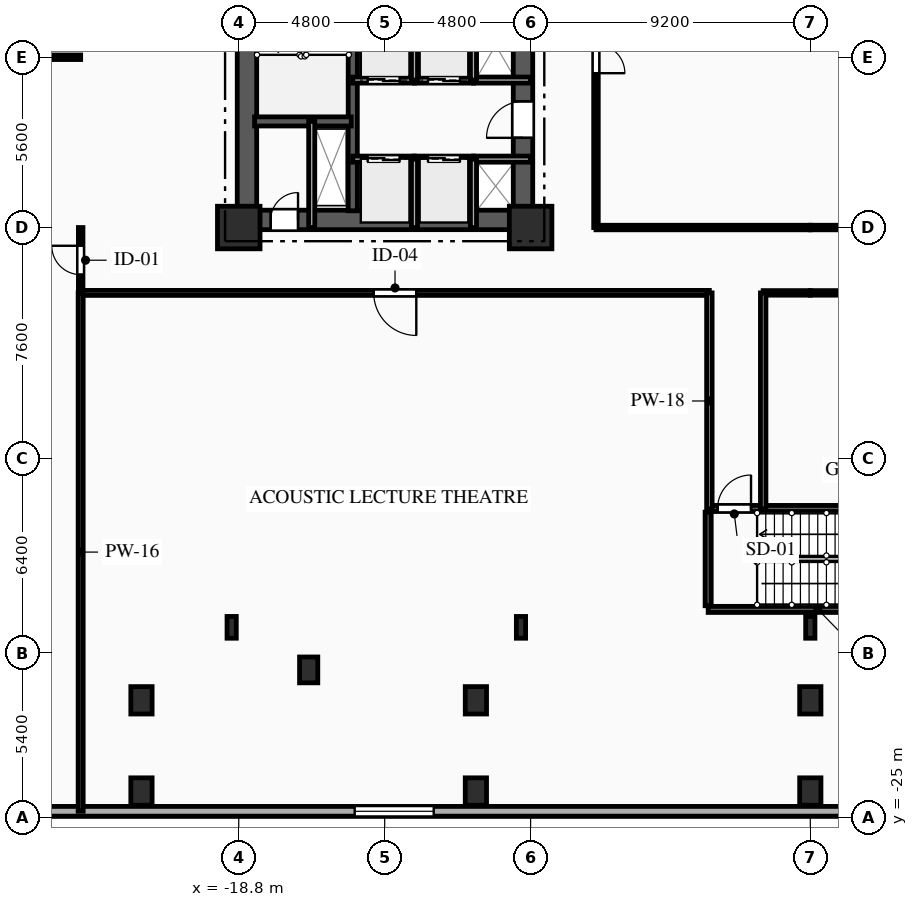
"""IFC4 building model, lengths in metres.
Left out: names, types, materials, properties, quantities, classifications, styles, units other than length and angle.
Written with IfcOpenShell. Run it as: python <this file> out.ifc"""

import sys

from ifc_helpers import new_model, si_unit, direction, frame, frame_2d, origin, origin_2d, place, context, subcontext, project, spatial, rectangle, i_section, extrude, element, fill, save


model = new_model("IFC4")
c1 = context("Model", 3, precision=1e-05, world=origin(), true_north=direction((0.0, 1.0)))
c2 = subcontext(c1, "Body", "Model", "MODEL_VIEW")
j1 = project(units=[si_unit("LENGTHUNIT", "METRE"), si_unit("PLANEANGLEUNIT", "RADIAN")], contexts=[c1])
p1 = place(None, origin())
s1 = spatial("IfcSite", under=j1, at=p1, CompositionType="ELEMENT")
p2 = place(p1, origin())
s2 = spatial("IfcBuilding", under=s1, at=p2, CompositionType="ELEMENT")
p3 = place(p2, frame((0.0, 0.0, 9.0)))
s3 = spatial("IfcBuildingStorey", under=s2, at=p3, CompositionType="ELEMENT", Elevation=9.0)
for number, where, z_axis, x_axis in (
    (1, (-18.8, -5.6, 0.0), (0.0, 0.0, 1.0), (1.0, 0.0, 0.0)),
    (2, (-9.2, -5.6, 0.0), (0.0, 0.0, 1.0), (1.0, 0.0, 0.0)),
):
    element("IfcColumn", number, at=place(p3, frame(where, z_axis=z_axis, x_axis=x_axis)), inside=s3, PredefinedType="COLUMN", context=c2, shape_type="SweptSolid", body=[
        extrude(rectangle(XDim=1.4, YDim=1.4, at=origin_2d()), origin(), (0.0, 0.0, 1.0), 4.5),
    ])
for number, where, z_axis, x_axis in (
    (3, (-22.0, -21.15, 0.0), (0.0, 0.0, 1.0), (1.0, 0.0, 0.0)),
    (4, (-11.0, -21.15, 0.0), (0.0, 0.0, 1.0), (1.0, 0.0, 0.0)),
    (5, (0.0, -21.15, 0.0), (0.0, 0.0, 1.0), (1.0, 0.0, 0.0)),
    (6, (-22.0, -24.15, 0.0), (0.0, 0.0, 1.0), (1.0, 0.0, 0.0)),
    (7, (-11.0, -24.15, 0.0), (0.0, 0.0, 1.0), (1.0, 0.0, 0.0)),
    (8, (0.0, -24.15, 0.0), (0.0, 0.0, 1.0), (1.0, 0.0, 0.0)),
):
    element("IfcColumn", number, at=place(p3, frame(where, z_axis=z_axis, x_axis=x_axis)), inside=s3, PredefinedType="COLUMN", context=c2, shape_type="SweptSolid", body=[
        extrude(rectangle(XDim=0.7, YDim=0.9, at=origin_2d()), origin(), (0.0, 0.0, 1.0), 4.5),
    ])
p4 = place(p3, frame((-16.5, -20.15, 0.0), z_axis=(0.0, 0.0, 1.0), x_axis=(1.0, 0.0, 0.0)))
e9 = element("IfcColumn", 9, at=p4, inside=s3, PredefinedType="PILASTER", context=c2, shape_type="SweptSolid", body=[
    extrude(rectangle(XDim=0.6, YDim=0.85, at=origin_2d()), origin(), (0.0, 0.0, 1.0), 4.5),
])
for number, where, z_axis, x_axis in (
    (10, (-19.033, -18.75, 0.0), (0.0, 0.0, 1.0), (1.0, 0.0, 0.0)),
    (11, (-9.517, -18.75, 0.0), (0.0, 0.0, 1.0), (1.0, 0.0, 0.0)),
    (12, (0.0, -18.75, 0.0), (0.0, 0.0, 1.0), (1.0, 0.0, 0.0)),
):
    element("IfcColumn", number, at=place(p3, frame(where, z_axis=z_axis, x_axis=x_axis)), inside=s3, PredefinedType="COLUMN", context=c2, shape_type="SweptSolid", body=[
        extrude(i_section(OverallWidth=0.304, OverallDepth=0.716, WebThickness=0.021, FlangeThickness=0.04, FilletRadius=0.027, at=origin_2d()), origin(), (0.0, 0.0, 1.0), 4.5),
    ])
p5 = place(p3, frame((38.3, -24.8, 0.0), z_axis=(0.0, 0.0, 1.0), x_axis=(-1.0, 0.0, 0.0)))
e13 = element("IfcWall", 13, at=p5, inside=s3, PredefinedType="SOLIDWALL", context=c2, shape_type="SweptSolid", body=[
    extrude(rectangle(XDim=76.6, YDim=0.32, at=frame_2d((38.3, 0.0))), origin(), (0.0, 0.0, 1.0), 4.17),
])
p6 = place(p5, frame((6.104, 0.0, 0.85)))
e14 = element("IfcOpeningElement", 14, at=p6, cuts=e13, PredefinedType="OPENING", context=c2, shape_type="SweptSolid", body=[
    extrude(rectangle(XDim=2.6, YDim=2.4, at=frame_2d((1.3, 1.2))), frame((0.0, 0.17, 0.0), z_axis=(0.0, -1.0, 0.0), x_axis=(1.0, 0.0, 0.0)), (0.0, 0.0, 1.0), 0.34),
])
p7 = place(p5, frame((30.797, 0.0, 0.85)))
e15 = element("IfcOpeningElement", 15, at=p7, cuts=e13, PredefinedType="OPENING", context=c2, shape_type="SweptSolid", body=[
    extrude(rectangle(XDim=2.6, YDim=2.4, at=frame_2d((1.3, 1.2))), frame((0.0, 0.17, 0.0), z_axis=(0.0, -1.0, 0.0), x_axis=(1.0, 0.0, 0.0)), (0.0, 0.0, 1.0), 0.34),
])
p8 = place(p5, frame((50.687, 0.0, 0.85)))
e16 = element("IfcOpeningElement", 16, at=p8, cuts=e13, PredefinedType="OPENING", context=c2, shape_type="SweptSolid", body=[
    extrude(rectangle(XDim=2.6, YDim=2.4, at=frame_2d((1.3, 1.2))), frame((0.0, 0.17, 0.0), z_axis=(0.0, -1.0, 0.0), x_axis=(1.0, 0.0, 0.0)), (0.0, 0.0, 1.0), 0.34),
])
p9 = place(p5, frame((67.976, 0.0, 0.85)))
e17 = element("IfcOpeningElement", 17, at=p9, cuts=e13, PredefinedType="OPENING", context=c2, shape_type="SweptSolid", body=[
    extrude(rectangle(XDim=2.6, YDim=2.4, at=frame_2d((1.3, 1.2))), frame((0.0, 0.17, 0.0), z_axis=(0.0, -1.0, 0.0), x_axis=(1.0, 0.0, 0.0)), (0.0, 0.0, 1.0), 0.34),
])
p10 = place(p3, frame((-18.8, -5.35, 0.0), z_axis=(0.0, 0.0, 1.0), x_axis=(1.0, 0.0, 0.0)))
e18 = element("IfcWall", 18, at=p10, inside=s3, PredefinedType="SHEAR", context=c2, shape_type="SweptSolid", body=[
    extrude(rectangle(XDim=9.6, YDim=0.64, at=frame_2d((4.8, 0.0))), origin(), (0.0, 0.0, 1.0), 4.17),
])
p11 = place(p10, frame((1.05, 0.0, 0.0)))
e19 = element("IfcOpeningElement", 19, at=p11, cuts=e18, PredefinedType="OPENING", context=c2, shape_type="SweptSolid", body=[
    extrude(rectangle(XDim=0.9, YDim=2.1, at=frame_2d((0.45, 1.05))), frame((0.0, 0.33, 0.0), z_axis=(0.0, -1.0, 0.0), x_axis=(1.0, 0.0, 0.0)), (0.0, 0.0, 1.0), 0.66),
])
p12 = place(p3, frame((-18.53, -5.05, 0.0), z_axis=(0.0, 0.0, 1.0), x_axis=(0.0, 1.0, 0.0)))
e20 = element("IfcWall", 20, at=p12, inside=s3, PredefinedType="SHEAR", context=c2, shape_type="SweptSolid", body=[
    extrude(rectangle(XDim=10.1, YDim=0.64, at=frame_2d((5.05, 0.0))), origin(), (0.0, 0.0, 1.0), 4.17),
])
p13 = place(p3, frame((-9.45, -5.05, 0.0), z_axis=(0.0, 0.0, 1.0), x_axis=(0.0, 1.0, 0.0)))
e21 = element("IfcWall", 21, at=p13, inside=s3, PredefinedType="SHEAR", context=c2, shape_type="SweptSolid", body=[
    extrude(rectangle(XDim=10.1, YDim=0.64, at=frame_2d((5.05, 0.0))), origin(), (0.0, 0.0, 1.0), 4.17),
])
p14 = place(p13, frame((7.15, 0.0, 0.0)))
e22 = element("IfcOpeningElement", 22, at=p14, cuts=e21, PredefinedType="OPENING", context=c2, shape_type="SweptSolid", body=[
    extrude(rectangle(XDim=0.9, YDim=2.1, at=frame_2d((0.45, 1.05))), frame((0.0, 0.33, 0.0), z_axis=(0.0, -1.0, 0.0), x_axis=(1.0, 0.0, 0.0)), (0.0, 0.0, 1.0), 0.66),
])
p15 = place(p13, frame((2.4, 0.0, 0.0)))
e23 = element("IfcOpeningElement", 23, at=p15, cuts=e21, PredefinedType="OPENING", context=c2, shape_type="SweptSolid", body=[
    extrude(rectangle(XDim=1.2, YDim=2.15, at=frame_2d((0.6, 1.075))), frame((0.0, 0.33, 0.0), z_axis=(0.0, -1.0, 0.0), x_axis=(1.0, 0.0, 0.0)), (0.0, 0.0, 1.0), 0.66),
])
p16 = place(p3, frame((-15.05, -5.05, 0.0), z_axis=(0.0, 0.0, 1.0), x_axis=(0.0, 1.0, 0.0)))
e24 = element("IfcWall", 24, at=p16, inside=s3, PredefinedType="SHEAR", context=c2, shape_type="SweptSolid", body=[
    extrude(rectangle(XDim=10.1, YDim=0.3, at=frame_2d((5.05, 0.0))), origin(), (0.0, 0.0, 1.0), 4.17),
])
p17 = place(p3, frame((-18.28, -2.11, 0.0), z_axis=(0.0, 0.0, 1.0), x_axis=(1.0, 0.0, 0.0)))
e25 = element("IfcWall", 25, at=p17, inside=s3, PredefinedType="SHEAR", context=c2, shape_type="SweptSolid", body=[
    extrude(rectangle(XDim=3.18, YDim=0.3, at=frame_2d((1.59, 0.0))), origin(), (0.0, 0.0, 1.0), 4.17),
])
p18 = place(p3, frame((-3.36, -14.84, 0.0), z_axis=(0.0, 0.0, 1.0), x_axis=(1.0, 0.0, 0.0)))
e26 = element("IfcWall", 26, at=p18, inside=s3, PredefinedType="SHEAR", context=c2, shape_type="SweptSolid", body=[
    extrude(rectangle(XDim=7.22, YDim=0.2, at=frame_2d((3.61, 0.0))), origin(), (0.0, 0.0, 1.0), 4.17),
])
p19 = place(p18, frame((0.31, 0.0, 0.0)))
e27 = element("IfcOpeningElement", 27, at=p19, cuts=e26, PredefinedType="OPENING", context=c2, shape_type="SweptSolid", body=[
    extrude(rectangle(XDim=1.1, YDim=2.15, at=frame_2d((0.55, 1.075))), frame((0.0, 0.11, 0.0), z_axis=(0.0, -1.0, 0.0), x_axis=(1.0, 0.0, 0.0)), (0.0, 0.0, 1.0), 0.22),
])
p20 = place(p3, frame((-3.36, -18.16, 0.0), z_axis=(0.0, 0.0, 1.0), x_axis=(1.0, 0.0, 0.0)))
e28 = element("IfcWall", 28, at=p20, inside=s3, PredefinedType="SHEAR", context=c2, shape_type="SweptSolid", body=[
    extrude(rectangle(XDim=7.22, YDim=0.2, at=frame_2d((3.61, 0.0))), origin(), (0.0, 0.0, 1.0), 4.17),
])
p21 = place(p3, frame((-3.36, -18.04, 0.0), z_axis=(0.0, 0.0, 1.0), x_axis=(0.0, 1.0, 0.0)))
e29 = element("IfcWall", 29, at=p21, inside=s3, PredefinedType="SHEAR", context=c2, shape_type="SweptSolid", body=[
    extrude(rectangle(XDim=3.08, YDim=0.2, at=frame_2d((1.54, 0.0))), origin(), (0.0, 0.0, 1.0), 4.17),
])
p22 = place(p3, frame((-16.4, -5.6, 0.0), z_axis=(0.0, 0.0, 1.0), x_axis=(0.0, 1.0, 0.0)))
e30 = element("IfcWall", 30, at=p22, inside=s3, PredefinedType="PARTITIONING", context=c2, shape_type="SweptSolid", body=[
    extrude(rectangle(XDim=3.49, YDim=0.2, at=frame_2d((1.745, 0.0))), origin(), (0.0, 0.0, 1.0), 4.17),
])
p23 = place(p3, frame((-15.05, -3.35, 0.0), z_axis=(0.0, 0.0, 1.0), x_axis=(1.0, 0.0, 0.0)))
e31 = element("IfcWall", 31, at=p23, inside=s3, PredefinedType="PARTITIONING", context=c2, shape_type="SweptSolid", body=[
    extrude(rectangle(XDim=2.03, YDim=0.2, at=frame_2d((1.015, 0.0))), origin(), (0.0, 0.0, 1.0), 4.17),
])
p24 = place(p23, frame((0.49, 0.0, 0.0)))
e32 = element("IfcOpeningElement", 32, at=p24, cuts=e31, PredefinedType="OPENING", context=c2, shape_type="SweptSolid", body=[
    extrude(rectangle(XDim=1.05, YDim=2.1, at=frame_2d((0.525, 1.05))), frame((0.0, 0.11, 0.0), z_axis=(0.0, -1.0, 0.0), x_axis=(1.0, 0.0, 0.0)), (0.0, 0.0, 1.0), 0.22),
])
p25 = place(p3, frame((-13.02, -3.35, 0.0), z_axis=(0.0, 0.0, 1.0), x_axis=(1.0, 0.0, 0.0)))
e33 = element("IfcWall", 33, at=p25, inside=s3, PredefinedType="PARTITIONING", context=c2, shape_type="SweptSolid", body=[
    extrude(rectangle(XDim=1.94, YDim=0.2, at=frame_2d((0.97, 0.0))), origin(), (0.0, 0.0, 1.0), 4.17),
])
p26 = place(p25, frame((0.445, 0.0, 0.0)))
e34 = element("IfcOpeningElement", 34, at=p26, cuts=e33, PredefinedType="OPENING", context=c2, shape_type="SweptSolid", body=[
    extrude(rectangle(XDim=1.05, YDim=2.1, at=frame_2d((0.525, 1.05))), frame((0.0, 0.11, 0.0), z_axis=(0.0, -1.0, 0.0), x_axis=(1.0, 0.0, 0.0)), (0.0, 0.0, 1.0), 0.22),
])
p27 = place(p3, frame((-11.08, -3.35, 0.0), z_axis=(0.0, 0.0, 1.0), x_axis=(1.0, 0.0, 0.0)))
e35 = element("IfcWall", 35, at=p27, inside=s3, PredefinedType="PARTITIONING", context=c2, shape_type="SweptSolid", body=[
    extrude(rectangle(XDim=1.88, YDim=0.2, at=frame_2d((0.94, 0.0))), origin(), (0.0, 0.0, 1.0), 3.885),
])
p28 = place(p3, frame((-13.02, -0.75, 0.0), z_axis=(0.0, 0.0, 1.0), x_axis=(-1.0, 0.0, 0.0)))
e36 = element("IfcWall", 36, at=p28, inside=s3, PredefinedType="PARTITIONING", context=c2, shape_type="SweptSolid", body=[
    extrude(rectangle(XDim=2.03, YDim=0.2, at=frame_2d((1.015, 0.0))), origin(), (0.0, 0.0, 1.0), 4.17),
])
p29 = place(p28, frame((0.49, 0.0, 0.0)))
e37 = element("IfcOpeningElement", 37, at=p29, cuts=e36, PredefinedType="OPENING", context=c2, shape_type="SweptSolid", body=[
    extrude(rectangle(XDim=1.05, YDim=2.1, at=frame_2d((0.525, 1.05))), frame((0.0, 0.11, 0.0), z_axis=(0.0, -1.0, 0.0), x_axis=(1.0, 0.0, 0.0)), (0.0, 0.0, 1.0), 0.22),
])
p30 = place(p3, frame((-11.08, -0.75, 0.0), z_axis=(0.0, 0.0, 1.0), x_axis=(-1.0, 0.0, 0.0)))
e38 = element("IfcWall", 38, at=p30, inside=s3, PredefinedType="PARTITIONING", context=c2, shape_type="SweptSolid", body=[
    extrude(rectangle(XDim=1.94, YDim=0.2, at=frame_2d((0.97, 0.0))), origin(), (0.0, 0.0, 1.0), 4.17),
])
p31 = place(p30, frame((0.445, 0.0, 0.0)))
e39 = element("IfcOpeningElement", 39, at=p31, cuts=e38, PredefinedType="OPENING", context=c2, shape_type="SweptSolid", body=[
    extrude(rectangle(XDim=1.05, YDim=2.1, at=frame_2d((0.525, 1.05))), frame((0.0, 0.11, 0.0), z_axis=(0.0, -1.0, 0.0), x_axis=(1.0, 0.0, 0.0)), (0.0, 0.0, 1.0), 0.22),
])
p32 = place(p3, frame((-9.2, -0.75, 0.0), z_axis=(0.0, 0.0, 1.0), x_axis=(-1.0, 0.0, 0.0)))
e40 = element("IfcWall", 40, at=p32, inside=s3, PredefinedType="PARTITIONING", context=c2, shape_type="SweptSolid", body=[
    extrude(rectangle(XDim=1.88, YDim=0.2, at=frame_2d((0.94, 0.0))), origin(), (0.0, 0.0, 1.0), 4.17),
])
for number, where, z_axis, x_axis in (
    (41, (-13.02, -5.6, 0.0), (0.0, 0.0, 1.0), (0.0, 1.0, 0.0)),
    (42, (-11.08, -5.6, 0.0), (0.0, 0.0, 1.0), (0.0, 1.0, 0.0)),
):
    element("IfcWall", number, at=place(p3, frame(where, z_axis=z_axis, x_axis=x_axis)), inside=s3, PredefinedType="PARTITIONING", context=c2, shape_type="SweptSolid", body=[
        extrude(rectangle(XDim=2.25, YDim=0.2, at=frame_2d((1.125, 0.0))), origin(), (0.0, 0.0, 1.0), 4.17),
    ])
for number, where, z_axis, x_axis in (
    (43, (-13.02, -0.75, 0.0), (0.0, 0.0, 1.0), (0.0, 1.0, 0.0)),
    (44, (-11.08, -0.75, 0.0), (0.0, 0.0, 1.0), (0.0, 1.0, 0.0)),
):
    element("IfcWall", number, at=place(p3, frame(where, z_axis=z_axis, x_axis=x_axis)), inside=s3, PredefinedType="PARTITIONING", context=c2, shape_type="SweptSolid", body=[
        extrude(rectangle(XDim=2.3, YDim=0.2, at=frame_2d((1.15, 0.0))), origin(), (0.0, 0.0, 1.0), 4.17),
    ])
p33 = place(p3, frame((-24.0, -7.75, 0.0), z_axis=(0.0, 0.0, 1.0), x_axis=(0.0, 1.0, 0.0)))
e45 = element("IfcWall", 45, at=p33, inside=s3, PredefinedType="PARTITIONING", context=c2, shape_type="SweptSolid", body=[
    extrude(rectangle(XDim=2.15, YDim=0.15, at=frame_2d((1.075, 0.0))), origin(), (0.0, 0.0, 1.0), 4.17),
])
p34 = place(p33, frame((0.6, 0.0, 0.0)))
e46 = element("IfcOpeningElement", 46, at=p34, cuts=e45, PredefinedType="OPENING", context=c2, shape_type="SweptSolid", body=[
    extrude(rectangle(XDim=0.95, YDim=2.1, at=frame_2d((0.475, 1.05))), frame((0.0, 0.085, 0.0), z_axis=(0.0, -1.0, 0.0), x_axis=(1.0, 0.0, 0.0)), (0.0, 0.0, 1.0), 0.17),
])
p35 = place(p3, frame((-3.32, -7.75, 0.0), z_axis=(0.0, 0.0, 1.0), x_axis=(-1.0, 0.0, 0.0)))
e47 = element("IfcWall", 47, at=p35, inside=s3, PredefinedType="PARTITIONING", context=c2, shape_type="SweptSolid", body=[
    extrude(rectangle(XDim=20.68, YDim=0.165, at=frame_2d((10.34, 0.0))), origin(), (0.0, 0.0, 1.0), 4.17),
])
p36 = place(p35, frame((9.64, 0.0, 0.0)))
e48 = element("IfcOpeningElement", 48, at=p36, cuts=e47, PredefinedType="OPENING", context=c2, shape_type="SweptSolid", body=[
    extrude(rectangle(XDim=1.4, YDim=2.3, at=frame_2d((0.7, 1.15))), frame((0.0, 0.093, 0.0), z_axis=(0.0, -1.0, 0.0), x_axis=(1.0, 0.0, 0.0)), (0.0, 0.0, 1.0), 0.185),
])
p37 = place(p3, frame((0.0, -7.75, 0.0), z_axis=(0.0, 0.0, 1.0), x_axis=(-1.0, 0.0, 0.0)))
e49 = element("IfcWall", 49, at=p37, inside=s3, PredefinedType="PARTITIONING", context=c2, shape_type="SweptSolid", body=[
    extrude(rectangle(XDim=1.55, YDim=0.15, at=frame_2d((0.775, 0.0))), origin(), (0.0, 0.0, 1.0), 4.17),
])
p38 = place(p3, frame((-7.05, -5.6, 0.0), z_axis=(0.0, 0.0, 1.0), x_axis=(1.0, 0.0, 0.0)))
e50 = element("IfcWall", 50, at=p38, inside=s3, PredefinedType="PARTITIONING", context=c2, shape_type="SweptSolid", body=[
    extrude(rectangle(XDim=7.05, YDim=0.15, at=frame_2d((3.525, 0.0))), origin(), (0.0, 0.0, 1.0), 3.147),
])
p39 = place(p3, frame((14.0, -7.75, 0.0), z_axis=(0.0, 0.0, 1.0), x_axis=(-1.0, 0.0, 0.0)))
e51 = element("IfcWall", 51, at=p39, inside=s3, PredefinedType="PARTITIONING", context=c2, shape_type="SweptSolid", body=[
    extrude(rectangle(XDim=14.0, YDim=0.15, at=frame_2d((7.0, 0.0))), origin(), (0.0, 0.0, 1.0), 4.17),
])
p40 = place(p39, frame((10.896, 0.0, 0.0)))
e52 = element("IfcOpeningElement", 52, at=p40, cuts=e51, PredefinedType="OPENING", context=c2, shape_type="SweptSolid", body=[
    extrude(rectangle(XDim=1.05, YDim=2.15, at=frame_2d((0.525, 1.075))), frame((0.0, 0.085, 0.0), z_axis=(0.0, -1.0, 0.0), x_axis=(1.0, 0.0, 0.0)), (0.0, 0.0, 1.0), 0.17),
])
p41 = place(p3, frame((0.0, -5.6, 0.0), z_axis=(0.0, 0.0, 1.0), x_axis=(1.0, 0.0, 0.0)))
e53 = element("IfcWall", 53, at=p41, inside=s3, PredefinedType="PARTITIONING", context=c2, shape_type="SweptSolid", body=[
    extrude(rectangle(XDim=7.05, YDim=0.15, at=frame_2d((3.525, 0.0))), origin(), (0.0, 0.0, 1.0), 3.147),
])
p42 = place(p3, frame((-7.05, 8.5, 0.0), z_axis=(0.0, 0.0, 1.0), x_axis=(0.0, -1.0, 0.0)))
e54 = element("IfcWall", 54, at=p42, inside=s3, PredefinedType="PARTITIONING", context=c2, shape_type="SweptSolid", body=[
    extrude(rectangle(XDim=14.1, YDim=0.15, at=frame_2d((7.05, 0.0))), origin(), (0.0, 0.0, 1.0), 4.17),
])
p43 = place(p42, frame((8.074, 0.0, 0.0)))
e55 = element("IfcOpeningElement", 55, at=p43, cuts=e54, PredefinedType="OPENING", context=c2, shape_type="SweptSolid", body=[
    extrude(rectangle(XDim=0.95, YDim=2.1, at=frame_2d((0.475, 1.05))), frame((0.0, 0.085, 0.0), z_axis=(0.0, -1.0, 0.0), x_axis=(1.0, 0.0, 0.0)), (0.0, 0.0, 1.0), 0.17),
])
for number, where, z_axis, x_axis in (
    (56, (-3.32, -14.86, 0.0), (0.0, 0.0, 1.0), (0.0, 1.0, 0.0)),
    (57, (-1.55, -7.75, 0.0), (0.0, 0.0, 1.0), (0.0, -1.0, 0.0)),
):
    element("IfcWall", number, at=place(p3, frame(where, z_axis=z_axis, x_axis=x_axis)), inside=s3, PredefinedType="PARTITIONING", context=c2, shape_type="SweptSolid", body=[
        extrude(rectangle(XDim=7.11, YDim=0.18, at=frame_2d((3.555, 0.0))), origin(), (0.0, 0.0, 1.0), 4.17),
    ])
p44 = place(p3, frame((-38.3, 0.0, 0.0), z_axis=(0.0, 0.0, 1.0), x_axis=(1.0, 0.0, 0.0)))
e58 = element("IfcWall", 58, at=p44, inside=s3, PredefinedType="PARTITIONING", context=c2, shape_type="SweptSolid", body=[
    extrude(rectangle(XDim=14.3, YDim=0.15, at=frame_2d((7.15, 0.0))), origin(), (0.0, 0.0, 1.0), 4.17),
])
p45 = place(p3, frame((-24.0, -7.75, 0.0), z_axis=(0.0, 0.0, 1.0), x_axis=(0.0, -1.0, 0.0)))
e59 = element("IfcWall", 59, at=p45, inside=s3, PredefinedType="PARTITIONING", context=c2, shape_type="SweptSolid", body=[
    extrude(rectangle(XDim=17.05, YDim=0.165, at=frame_2d((8.525, 0.0))), origin(), (0.0, 0.0, 1.0), 4.17),
])
p46 = place(p8, origin())
e60 = element("IfcWindow", 60, at=p46, inside=s3, PartitioningType="SINGLE_PANEL", PredefinedType="WINDOW", context=c2, shape_type="SweptSolid", body=[
    extrude(rectangle(XDim=2.6, YDim=2.4, at=frame_2d((1.3, 1.2))), frame((0.0, 0.03, 0.0), z_axis=(0.0, -1.0, 0.0), x_axis=(1.0, 0.0, 0.0)), (0.0, 0.0, 1.0), 0.06),
])
fill(e16, e60)
p47 = place(p11, origin())
e61 = element("IfcDoor", 61, at=p47, inside=s3, OperationType="SINGLE_SWING_RIGHT", PredefinedType="DOOR", context=c2, shape_type="SweptSolid", body=[
    extrude(rectangle(XDim=0.9, YDim=2.1, at=frame_2d((0.45, 1.05))), frame((0.0, 0.025, 0.0), z_axis=(0.0, -1.0, 0.0), x_axis=(1.0, 0.0, 0.0)), (0.0, 0.0, 1.0), 0.05),
])
fill(e19, e61)
p48 = place(p19, origin())
e62 = element("IfcDoor", 62, at=p48, inside=s3, OperationType="SINGLE_SWING_RIGHT", PredefinedType="DOOR", context=c2, shape_type="SweptSolid", body=[
    extrude(rectangle(XDim=1.1, YDim=2.15, at=frame_2d((0.55, 1.075))), frame((0.0, 0.025, 0.0), z_axis=(0.0, -1.0, 0.0), x_axis=(1.0, 0.0, 0.0)), (0.0, 0.0, 1.0), 0.05),
])
fill(e27, e62)
p49 = place(p24, origin())
e63 = element("IfcDoor", 63, at=p49, inside=s3, OperationType="DOUBLE_DOOR_SLIDING", PredefinedType="DOOR", context=c2, shape_type="SweptSolid", body=[
    extrude(rectangle(XDim=1.05, YDim=2.1, at=frame_2d((0.525, 1.05))), frame((0.0, 0.025, 0.0), z_axis=(0.0, -1.0, 0.0), x_axis=(1.0, 0.0, 0.0)), (0.0, 0.0, 1.0), 0.05),
])
fill(e32, e63)
p50 = place(p26, origin())
e64 = element("IfcDoor", 64, at=p50, inside=s3, OperationType="DOUBLE_DOOR_SLIDING", PredefinedType="DOOR", context=c2, shape_type="SweptSolid", body=[
    extrude(rectangle(XDim=1.05, YDim=2.1, at=frame_2d((0.525, 1.05))), frame((0.0, 0.025, 0.0), z_axis=(0.0, -1.0, 0.0), x_axis=(1.0, 0.0, 0.0)), (0.0, 0.0, 1.0), 0.05),
])
fill(e34, e64)
p51 = place(p29, origin())
e65 = element("IfcDoor", 65, at=p51, inside=s3, OperationType="DOUBLE_DOOR_SLIDING", PredefinedType="DOOR", context=c2, shape_type="SweptSolid", body=[
    extrude(rectangle(XDim=1.05, YDim=2.1, at=frame_2d((0.525, 1.05))), frame((0.0, 0.025, 0.0), z_axis=(0.0, -1.0, 0.0), x_axis=(1.0, 0.0, 0.0)), (0.0, 0.0, 1.0), 0.05),
])
fill(e37, e65)
p52 = place(p31, origin())
e66 = element("IfcDoor", 66, at=p52, inside=s3, OperationType="DOUBLE_DOOR_SLIDING", PredefinedType="DOOR", context=c2, shape_type="SweptSolid", body=[
    extrude(rectangle(XDim=1.05, YDim=2.1, at=frame_2d((0.525, 1.05))), frame((0.0, 0.025, 0.0), z_axis=(0.0, -1.0, 0.0), x_axis=(1.0, 0.0, 0.0)), (0.0, 0.0, 1.0), 0.05),
])
fill(e39, e66)
p53 = place(p15, origin())
e67 = element("IfcDoor", 67, at=p53, inside=s3, OperationType="SINGLE_SWING_LEFT", PredefinedType="DOOR", context=c2, shape_type="SweptSolid", body=[
    extrude(rectangle(XDim=1.2, YDim=2.15, at=frame_2d((0.6, 1.075))), frame((0.0, 0.025, 0.0), z_axis=(0.0, -1.0, 0.0), x_axis=(1.0, 0.0, 0.0)), (0.0, 0.0, 1.0), 0.05),
])
fill(e23, e67)
p54 = place(p34, origin())
e68 = element("IfcDoor", 68, at=p54, inside=s3, OperationType="SINGLE_SWING_RIGHT", PredefinedType="DOOR", context=c2, shape_type="SweptSolid", body=[
    extrude(rectangle(XDim=0.95, YDim=2.1, at=frame_2d((0.475, 1.05))), frame((0.0, 0.025, 0.0), z_axis=(0.0, -1.0, 0.0), x_axis=(1.0, 0.0, 0.0)), (0.0, 0.0, 1.0), 0.05),
])
fill(e46, e68)
p55 = place(p36, origin())
e69 = element("IfcDoor", 69, at=p55, inside=s3, OperationType="SINGLE_SWING_LEFT", PredefinedType="DOOR", context=c2, shape_type="SweptSolid", body=[
    extrude(rectangle(XDim=1.4, YDim=2.3, at=frame_2d((0.7, 1.15))), frame((0.0, 0.025, 0.0), z_axis=(0.0, -1.0, 0.0), x_axis=(1.0, 0.0, 0.0)), (0.0, 0.0, 1.0), 0.05),
])
fill(e48, e69)
p56 = place(p43, origin())
e70 = element("IfcDoor", 70, at=p56, inside=s3, OperationType="SINGLE_SWING_RIGHT", PredefinedType="DOOR", context=c2, shape_type="SweptSolid", body=[
    extrude(rectangle(XDim=0.95, YDim=2.1, at=frame_2d((0.475, 1.05))), frame((0.0, 0.025, 0.0), z_axis=(0.0, -1.0, 0.0), x_axis=(1.0, 0.0, 0.0)), (0.0, 0.0, 1.0), 0.05),
])
fill(e55, e70)
save(model, sys.argv[1])
